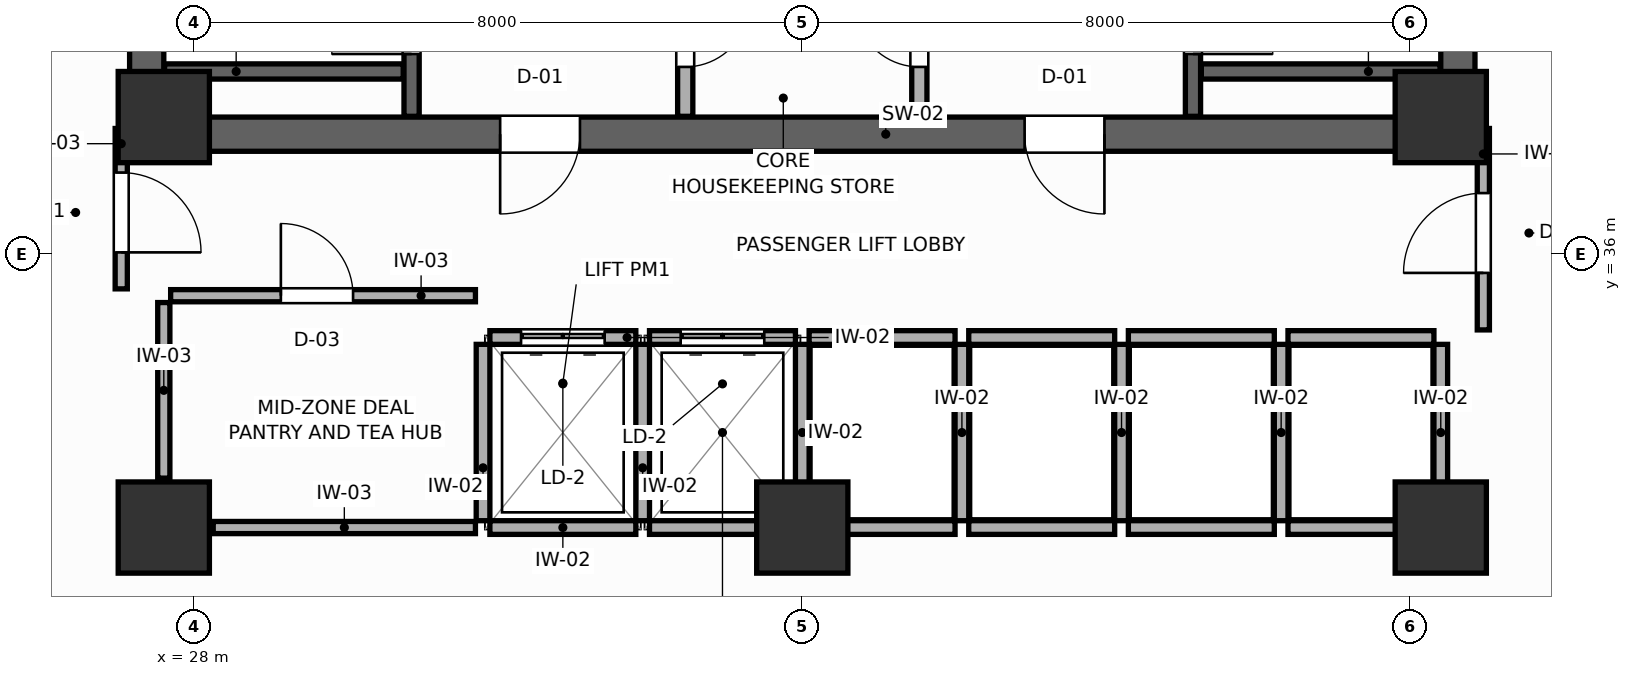
"""IFC4 building model, lengths in metres.
Left out: names, types, materials, properties, quantities, classifications, styles, units other than length and angle.
Written with IfcOpenShell. Run it as: python <this file> out.ifc"""

import sys

from ifc_helpers import new_model, si_unit, direction, frame, frame_2d, origin, origin_2d, place, context, subcontext, project, spatial, rectangle, extrude, source, transform, mapped, element, fill, save


model = new_model("IFC4")
c1 = context("Model", 3, precision=1e-05, world=origin(), true_north=direction((0.0, 1.0)))
c2 = subcontext(c1, "Body", "Model", "MODEL_VIEW")
j1 = project(units=[si_unit("LENGTHUNIT", "METRE"), si_unit("PLANEANGLEUNIT", "RADIAN")], contexts=[c1])
p1 = place(None, origin())
s1 = spatial("IfcSite", under=j1, at=p1, CompositionType="ELEMENT")
p2 = place(p1, origin())
s2 = spatial("IfcBuilding", under=s1, at=p2, CompositionType="ELEMENT")
p3 = place(p2, frame((0.0, 0.0, 117.0)))
s3 = spatial("IfcBuildingStorey", under=s2, at=p3, CompositionType="ELEMENT", Elevation=117.0)
p4 = place(p3, frame((27.15, 37.575, 0.0), z_axis=(0.0, 0.0, 1.0), x_axis=(1.0, 0.0, 0.0)))
e1 = element("IfcWall", 1, at=p4, inside=s3, PredefinedType="SHEAR", context=c2, shape_type="SweptSolid", body=[
    extrude(rectangle(XDim=17.7, YDim=0.45, at=frame_2d((8.85, 0.0))), origin(), (0.0, 0.0, 1.0), 3.6),
])
p5 = place(p4, frame((4.875, 0.0, 0.0)))
e2 = element("IfcOpeningElement", 2, at=p5, cuts=e1, PredefinedType="OPENING", context=c2, shape_type="SweptSolid", body=[
    extrude(rectangle(XDim=1.05, YDim=2.1, at=frame_2d((0.525, 1.05))), frame((0.0, 0.235, 0.0), z_axis=(0.0, -1.0, 0.0), x_axis=(1.0, 0.0, 0.0)), (0.0, 0.0, 1.0), 0.47),
])
p6 = place(p4, frame((11.775, 0.0, 0.0)))
e3 = element("IfcOpeningElement", 3, at=p6, cuts=e1, PredefinedType="OPENING", context=c2, shape_type="SweptSolid", body=[
    extrude(rectangle(XDim=1.05, YDim=2.1, at=frame_2d((0.525, 1.05))), frame((0.0, 0.235, 0.0), z_axis=(0.0, -1.0, 0.0), x_axis=(1.0, 0.0, 0.0)), (0.0, 0.0, 1.0), 0.47),
])
for number, where, z_axis, x_axis in (
    (4, (27.375, 37.8, 0.0), (0.0, 0.0, 1.0), (0.0, 1.0, 0.0)),
    (5, (44.625, 37.8, 0.0), (0.0, 0.0, 1.0), (0.0, 1.0, 0.0)),
):
    element("IfcWall", number, at=place(p3, frame(where, z_axis=z_axis, x_axis=x_axis)), inside=s3, PredefinedType="SHEAR", context=c2, shape_type="SweptSolid", body=[
        extrude(rectangle(XDim=9.0, YDim=0.45, at=frame_2d((4.5, 0.0))), origin(), (0.0, 0.0, 1.0), 3.6),
    ])
m1 = source(origin(), c2, "Body", "SweptSolid", [
    extrude(rectangle(XDim=1.2, YDim=1.2, at=origin_2d()), origin(), (0.0, 0.0, 1.0), 3.6),
])
for number, where, z_axis, x_axis in (
    (6, (27.6, 37.8, 0.0), (0.0, 0.0, 1.0), (1.0, 0.0, 0.0)),
    (7, (44.4, 37.8, 0.0), (0.0, 0.0, 1.0), (1.0, 0.0, 0.0)),
    (8, (27.6, 32.4, 0.0), (0.0, 0.0, 1.0), (1.0, 0.0, 0.0)),
    (9, (44.4, 32.4, 0.0), (0.0, 0.0, 1.0), (1.0, 0.0, 0.0)),
    (10, (36.0, 32.4, 0.0), (0.0, 0.0, 1.0), (1.0, 0.0, 0.0)),
):
    element("IfcColumn", number, at=place(p3, frame(where, z_axis=z_axis, x_axis=x_axis)), inside=s3, PredefinedType="COLUMN", context=c2, shape_type="MappedRepresentation", body=[
        mapped(m1, transform((0.0, 0.0, 0.0), scale=1.0)),
    ])
p7 = place(p3, frame((30.86, 37.81, 0.0), z_axis=(0.0, 0.0, 1.0), x_axis=(0.0, 1.0, 0.0)))
e11 = element("IfcWall", 11, at=p7, inside=s3, PredefinedType="SHEAR", context=c2, shape_type="SweptSolid", body=[
    extrude(rectangle(XDim=8.98, YDim=0.2, at=frame_2d((4.49, 0.0))), origin(), (0.0, 0.0, 1.0), 3.6),
])
p8 = place(p7, frame((0.82, 0.0, 0.0)))
e12 = element("IfcOpeningElement", 12, at=p8, cuts=e11, PredefinedType="OPENING", context=c2, shape_type="SweptSolid", body=[
    extrude(rectangle(XDim=1.05, YDim=2.1, at=frame_2d((0.525, 1.05))), frame((0.0, 0.11, 0.0), z_axis=(0.0, -1.0, 0.0), x_axis=(1.0, 0.0, 0.0)), (0.0, 0.0, 1.0), 0.22),
])
p9 = place(p3, frame((27.61, 38.4, 0.0), z_axis=(0.0, 0.0, 1.0), x_axis=(1.0, 0.0, 0.0)))
e13 = element("IfcWall", 13, at=p9, inside=s3, PredefinedType="SHEAR", context=c2, shape_type="SweptSolid", body=[
    extrude(rectangle(XDim=3.14, YDim=0.2, at=frame_2d((1.57, 0.0))), origin(), (0.0, 0.0, 1.0), 3.6),
])
p10 = place(p3, frame((41.14, 37.81, 0.0), z_axis=(0.0, 0.0, 1.0), x_axis=(0.0, 1.0, 0.0)))
e14 = element("IfcWall", 14, at=p10, inside=s3, PredefinedType="SHEAR", context=c2, shape_type="SweptSolid", body=[
    extrude(rectangle(XDim=8.98, YDim=0.2, at=frame_2d((4.49, 0.0))), origin(), (0.0, 0.0, 1.0), 3.6),
])
p11 = place(p10, frame((0.82, 0.0, 0.0)))
e15 = element("IfcOpeningElement", 15, at=p11, cuts=e14, PredefinedType="OPENING", context=c2, shape_type="SweptSolid", body=[
    extrude(rectangle(XDim=1.05, YDim=2.1, at=frame_2d((0.525, 1.05))), frame((0.0, 0.11, 0.0), z_axis=(0.0, -1.0, 0.0), x_axis=(1.0, 0.0, 0.0)), (0.0, 0.0, 1.0), 0.22),
])
p12 = place(p3, frame((41.25, 38.4, 0.0), z_axis=(0.0, 0.0, 1.0), x_axis=(1.0, 0.0, 0.0)))
e16 = element("IfcWall", 16, at=p12, inside=s3, PredefinedType="SHEAR", context=c2, shape_type="SweptSolid", body=[
    extrude(rectangle(XDim=3.14, YDim=0.2, at=frame_2d((1.57, 0.0))), origin(), (0.0, 0.0, 1.0), 3.6),
])
p13 = place(p3, frame((34.46, 37.81, 0.0), z_axis=(0.0, 0.0, 1.0), x_axis=(0.0, 1.0, 0.0)))
e17 = element("IfcWall", 17, at=p13, inside=s3, PredefinedType="PARTITIONING", context=c2, shape_type="SweptSolid", body=[
    extrude(rectangle(XDim=8.98, YDim=0.2, at=frame_2d((4.49, 0.0))), origin(), (0.0, 0.0, 1.0), 3.4),
])
p14 = place(p13, frame((0.65, 0.0, 0.0)))
e18 = element("IfcOpeningElement", 18, at=p14, cuts=e17, PredefinedType="OPENING", context=c2, shape_type="SweptSolid", body=[
    extrude(rectangle(XDim=0.85, YDim=2.05, at=frame_2d((0.425, 1.025))), frame((0.0, 0.11, 0.0), z_axis=(0.0, -1.0, 0.0), x_axis=(1.0, 0.0, 0.0)), (0.0, 0.0, 1.0), 0.22),
])
p15 = place(p3, frame((37.54, 37.81, 0.0), z_axis=(0.0, 0.0, 1.0), x_axis=(0.0, 1.0, 0.0)))
e19 = element("IfcWall", 19, at=p15, inside=s3, PredefinedType="PARTITIONING", context=c2, shape_type="SweptSolid", body=[
    extrude(rectangle(XDim=8.98, YDim=0.2, at=frame_2d((4.49, 0.0))), origin(), (0.0, 0.0, 1.0), 3.4),
])
p16 = place(p15, frame((0.65, 0.0, 0.0)))
e20 = element("IfcOpeningElement", 20, at=p16, cuts=e19, PredefinedType="OPENING", context=c2, shape_type="SweptSolid", body=[
    extrude(rectangle(XDim=0.85, YDim=2.05, at=frame_2d((0.425, 1.025))), frame((0.0, 0.11, 0.0), z_axis=(0.0, -1.0, 0.0), x_axis=(1.0, 0.0, 0.0)), (0.0, 0.0, 1.0), 0.22),
])
p17 = place(p3, frame((31.89, 34.9, 0.0), z_axis=(0.0, 0.0, 1.0), x_axis=(1.0, 0.0, 0.0)))
e21 = element("IfcWall", 21, at=p17, inside=s3, PredefinedType="PARTITIONING", context=c2, shape_type="SweptSolid", body=[
    extrude(rectangle(XDim=1.92, YDim=0.18, at=frame_2d((0.96, 0.0))), origin(), (0.0, 0.0, 1.0), 3.4),
])
p18 = place(p17, frame((0.41, 0.0, 0.0)))
e22 = element("IfcOpeningElement", 22, at=p18, cuts=e21, PredefinedType="OPENING", context=c2, shape_type="SweptSolid", body=[
    extrude(rectangle(XDim=1.1, YDim=2.1, at=frame_2d((0.55, 1.05))), frame((0.0, 0.1, 0.0), z_axis=(0.0, -1.0, 0.0), x_axis=(1.0, 0.0, 0.0)), (0.0, 0.0, 1.0), 0.2),
])
p19 = place(p3, frame((31.89, 32.4, 0.0), z_axis=(0.0, 0.0, 1.0), x_axis=(1.0, 0.0, 0.0)))
e23 = element("IfcWall", 23, at=p19, inside=s3, PredefinedType="PARTITIONING", context=c2, shape_type="SweptSolid", body=[
    extrude(rectangle(XDim=1.92, YDim=0.18, at=frame_2d((0.96, 0.0))), origin(), (0.0, 0.0, 1.0), 2.16),
])
p20 = place(p3, frame((31.8, 32.49, 0.0), z_axis=(0.0, 0.0, 1.0), x_axis=(0.0, 1.0, 0.0)))
e24 = element("IfcWall", 24, at=p20, inside=s3, PredefinedType="PARTITIONING", context=c2, shape_type="SweptSolid", body=[
    extrude(rectangle(XDim=2.32, YDim=0.18, at=frame_2d((1.16, 0.0))), origin(), (0.0, 0.0, 1.0), 3.4),
])
p21 = place(p3, frame((33.99, 34.9, 0.0), z_axis=(0.0, 0.0, 1.0), x_axis=(1.0, 0.0, 0.0)))
e25 = element("IfcWall", 25, at=p21, inside=s3, PredefinedType="PARTITIONING", context=c2, shape_type="SweptSolid", body=[
    extrude(rectangle(XDim=1.92, YDim=0.18, at=frame_2d((0.96, 0.0))), origin(), (0.0, 0.0, 1.0), 3.4),
])
p22 = place(p21, frame((0.41, 0.0, 0.0)))
e26 = element("IfcOpeningElement", 26, at=p22, cuts=e25, PredefinedType="OPENING", context=c2, shape_type="SweptSolid", body=[
    extrude(rectangle(XDim=1.1, YDim=2.1, at=frame_2d((0.55, 1.05))), frame((0.0, 0.1, 0.0), z_axis=(0.0, -1.0, 0.0), x_axis=(1.0, 0.0, 0.0)), (0.0, 0.0, 1.0), 0.2),
])
p23 = place(p3, frame((33.99, 32.4, 0.0), z_axis=(0.0, 0.0, 1.0), x_axis=(1.0, 0.0, 0.0)))
e27 = element("IfcWall", 27, at=p23, inside=s3, PredefinedType="PARTITIONING", context=c2, shape_type="SweptSolid", body=[
    extrude(rectangle(XDim=1.92, YDim=0.18, at=frame_2d((0.96, 0.0))), origin(), (0.0, 0.0, 1.0), 2.16),
])
p24 = place(p3, frame((33.9, 32.49, 0.0), z_axis=(0.0, 0.0, 1.0), x_axis=(0.0, 1.0, 0.0)))
e28 = element("IfcWall", 28, at=p24, inside=s3, PredefinedType="PARTITIONING", context=c2, shape_type="SweptSolid", body=[
    extrude(rectangle(XDim=2.32, YDim=0.18, at=frame_2d((1.16, 0.0))), origin(), (0.0, 0.0, 1.0), 3.4),
])
p25 = place(p3, frame((36.09, 34.9, 0.0), z_axis=(0.0, 0.0, 1.0), x_axis=(1.0, 0.0, 0.0)))
e29 = element("IfcWall", 29, at=p25, inside=s3, PredefinedType="PARTITIONING", context=c2, shape_type="SweptSolid", body=[
    extrude(rectangle(XDim=1.92, YDim=0.18, at=frame_2d((0.96, 0.0))), origin(), (0.0, 0.0, 1.0), 3.4),
])
p26 = place(p3, frame((36.09, 32.4, 0.0), z_axis=(0.0, 0.0, 1.0), x_axis=(1.0, 0.0, 0.0)))
e30 = element("IfcWall", 30, at=p26, inside=s3, PredefinedType="PARTITIONING", context=c2, shape_type="SweptSolid", body=[
    extrude(rectangle(XDim=1.92, YDim=0.18, at=frame_2d((0.96, 0.0))), origin(), (0.0, 0.0, 1.0), 2.16),
])
p27 = place(p3, frame((36.0, 32.49, 0.0), z_axis=(0.0, 0.0, 1.0), x_axis=(0.0, 1.0, 0.0)))
e31 = element("IfcWall", 31, at=p27, inside=s3, PredefinedType="PARTITIONING", context=c2, shape_type="SweptSolid", body=[
    extrude(rectangle(XDim=2.32, YDim=0.18, at=frame_2d((1.16, 0.0))), origin(), (0.0, 0.0, 1.0), 3.4),
])
p28 = place(p3, frame((38.19, 34.9, 0.0), z_axis=(0.0, 0.0, 1.0), x_axis=(1.0, 0.0, 0.0)))
e32 = element("IfcWall", 32, at=p28, inside=s3, PredefinedType="PARTITIONING", context=c2, shape_type="SweptSolid", body=[
    extrude(rectangle(XDim=1.92, YDim=0.18, at=frame_2d((0.96, 0.0))), origin(), (0.0, 0.0, 1.0), 3.4),
])
p29 = place(p3, frame((38.19, 32.4, 0.0), z_axis=(0.0, 0.0, 1.0), x_axis=(1.0, 0.0, 0.0)))
e33 = element("IfcWall", 33, at=p29, inside=s3, PredefinedType="PARTITIONING", context=c2, shape_type="SweptSolid", body=[
    extrude(rectangle(XDim=1.92, YDim=0.18, at=frame_2d((0.96, 0.0))), origin(), (0.0, 0.0, 1.0), 2.16),
])
p30 = place(p3, frame((38.1, 32.49, 0.0), z_axis=(0.0, 0.0, 1.0), x_axis=(0.0, 1.0, 0.0)))
e34 = element("IfcWall", 34, at=p30, inside=s3, PredefinedType="PARTITIONING", context=c2, shape_type="SweptSolid", body=[
    extrude(rectangle(XDim=2.32, YDim=0.18, at=frame_2d((1.16, 0.0))), origin(), (0.0, 0.0, 1.0), 3.4),
])
p31 = place(p3, frame((40.29, 34.9, 0.0), z_axis=(0.0, 0.0, 1.0), x_axis=(1.0, 0.0, 0.0)))
e35 = element("IfcWall", 35, at=p31, inside=s3, PredefinedType="PARTITIONING", context=c2, shape_type="SweptSolid", body=[
    extrude(rectangle(XDim=1.92, YDim=0.18, at=frame_2d((0.96, 0.0))), origin(), (0.0, 0.0, 1.0), 3.4),
])
p32 = place(p3, frame((40.29, 32.4, 0.0), z_axis=(0.0, 0.0, 1.0), x_axis=(1.0, 0.0, 0.0)))
e36 = element("IfcWall", 36, at=p32, inside=s3, PredefinedType="PARTITIONING", context=c2, shape_type="SweptSolid", body=[
    extrude(rectangle(XDim=1.92, YDim=0.18, at=frame_2d((0.96, 0.0))), origin(), (0.0, 0.0, 1.0), 2.16),
])
p33 = place(p3, frame((40.2, 32.49, 0.0), z_axis=(0.0, 0.0, 1.0), x_axis=(0.0, 1.0, 0.0)))
e37 = element("IfcWall", 37, at=p33, inside=s3, PredefinedType="PARTITIONING", context=c2, shape_type="SweptSolid", body=[
    extrude(rectangle(XDim=2.32, YDim=0.18, at=frame_2d((1.16, 0.0))), origin(), (0.0, 0.0, 1.0), 3.4),
])
p34 = place(p3, frame((42.39, 34.9, 0.0), z_axis=(0.0, 0.0, 1.0), x_axis=(1.0, 0.0, 0.0)))
e38 = element("IfcWall", 38, at=p34, inside=s3, PredefinedType="PARTITIONING", context=c2, shape_type="SweptSolid", body=[
    extrude(rectangle(XDim=1.92, YDim=0.18, at=frame_2d((0.96, 0.0))), origin(), (0.0, 0.0, 1.0), 3.4),
])
p35 = place(p3, frame((42.39, 32.4, 0.0), z_axis=(0.0, 0.0, 1.0), x_axis=(1.0, 0.0, 0.0)))
e39 = element("IfcWall", 39, at=p35, inside=s3, PredefinedType="PARTITIONING", context=c2, shape_type="SweptSolid", body=[
    extrude(rectangle(XDim=1.92, YDim=0.18, at=frame_2d((0.96, 0.0))), origin(), (0.0, 0.0, 1.0), 2.16),
])
for number, where, z_axis, x_axis in (
    (40, (42.3, 32.49, 0.0), (0.0, 0.0, 1.0), (0.0, 1.0, 0.0)),
    (41, (44.4, 32.49, 0.0), (0.0, 0.0, 1.0), (0.0, 1.0, 0.0)),
):
    element("IfcWall", number, at=place(p3, frame(where, z_axis=z_axis, x_axis=x_axis)), inside=s3, PredefinedType="PARTITIONING", context=c2, shape_type="SweptSolid", body=[
        extrude(rectangle(XDim=2.32, YDim=0.18, at=frame_2d((1.16, 0.0))), origin(), (0.0, 0.0, 1.0), 3.4),
    ])
p36 = place(p3, frame((28.25, 32.4, 0.0), z_axis=(0.0, 0.0, 1.0), x_axis=(1.0, 0.0, 0.0)))
e42 = element("IfcWall", 42, at=p36, inside=s3, PredefinedType="PARTITIONING", context=c2, shape_type="SweptSolid", body=[
    extrude(rectangle(XDim=3.45, YDim=0.16, at=frame_2d((1.725, 0.0))), origin(), (0.0, 0.0, 1.0), 2.16),
])
p37 = place(p3, frame((27.6, 33.05, 0.0), z_axis=(0.0, 0.0, 1.0), x_axis=(0.0, 1.0, 0.0)))
e43 = element("IfcWall", 43, at=p37, inside=s3, PredefinedType="PARTITIONING", context=c2, shape_type="SweptSolid", body=[
    extrude(rectangle(XDim=2.31, YDim=0.16, at=frame_2d((1.155, 0.0))), origin(), (0.0, 0.0, 1.0), 3.4),
])
p38 = place(p3, frame((27.69, 35.45, 0.0), z_axis=(0.0, 0.0, 1.0), x_axis=(1.0, 0.0, 0.0)))
e44 = element("IfcWall", 44, at=p38, inside=s3, PredefinedType="PARTITIONING", context=c2, shape_type="SweptSolid", body=[
    extrude(rectangle(XDim=4.01, YDim=0.16, at=frame_2d((2.005, 0.0))), origin(), (0.0, 0.0, 1.0), 3.4),
])
p39 = place(p38, frame((1.45, 0.0, 0.0)))
e45 = element("IfcOpeningElement", 45, at=p39, cuts=e44, PredefinedType="OPENING", context=c2, shape_type="SweptSolid", body=[
    extrude(rectangle(XDim=0.95, YDim=2.05, at=frame_2d((0.475, 1.025))), frame((0.0, 0.09, 0.0), z_axis=(0.0, -1.0, 0.0), x_axis=(1.0, 0.0, 0.0)), (0.0, 0.0, 1.0), 0.18),
])
p40 = place(p3, frame((27.04, 35.54, 0.0), z_axis=(0.0, 0.0, 1.0), x_axis=(0.0, 1.0, 0.0)))
e46 = element("IfcWall", 46, at=p40, inside=s3, PredefinedType="PARTITIONING", context=c2, shape_type="SweptSolid", body=[
    extrude(rectangle(XDim=2.11, YDim=0.16, at=frame_2d((1.055, 0.0))), origin(), (0.0, 0.0, 1.0), 3.4),
])
p41 = place(p40, frame((0.48, 0.0, 0.0)))
e47 = element("IfcOpeningElement", 47, at=p41, cuts=e46, PredefinedType="OPENING", context=c2, shape_type="SweptSolid", body=[
    extrude(rectangle(XDim=1.05, YDim=2.1, at=frame_2d((0.525, 1.05))), frame((0.0, 0.09, 0.0), z_axis=(0.0, -1.0, 0.0), x_axis=(1.0, 0.0, 0.0)), (0.0, 0.0, 1.0), 0.18),
])
p42 = place(p3, frame((44.96, 35.0, 0.0), z_axis=(0.0, 0.0, 1.0), x_axis=(0.0, 1.0, 0.0)))
e48 = element("IfcWall", 48, at=p42, inside=s3, PredefinedType="PARTITIONING", context=c2, shape_type="SweptSolid", body=[
    extrude(rectangle(XDim=2.65, YDim=0.16, at=frame_2d((1.325, 0.0))), origin(), (0.0, 0.0, 1.0), 3.4),
])
p43 = place(p42, frame((0.75, 0.0, 0.0)))
e49 = element("IfcOpeningElement", 49, at=p43, cuts=e48, PredefinedType="OPENING", context=c2, shape_type="SweptSolid", body=[
    extrude(rectangle(XDim=1.05, YDim=2.1, at=frame_2d((0.525, 1.05))), frame((0.0, 0.09, 0.0), z_axis=(0.0, -1.0, 0.0), x_axis=(1.0, 0.0, 0.0)), (0.0, 0.0, 1.0), 0.18),
])
p44 = place(p8, origin())
e50 = element("IfcDoor", 50, at=p44, inside=s3, OperationType="SINGLE_SWING_LEFT", PredefinedType="DOOR", context=c2, shape_type="SweptSolid", body=[
    extrude(rectangle(XDim=1.05, YDim=2.1, at=frame_2d((0.525, 1.05))), frame((0.0, 0.025, 0.0), z_axis=(0.0, -1.0, 0.0), x_axis=(1.0, 0.0, 0.0)), (0.0, 0.0, 1.0), 0.05),
])
fill(e12, e50)
p45 = place(p11, frame((1.05, 0.0, 0.0), z_axis=(0.0, 0.0, 1.0), x_axis=(-1.0, 0.0, 0.0)))
e51 = element("IfcDoor", 51, at=p45, inside=s3, OperationType="SINGLE_SWING_RIGHT", PredefinedType="DOOR", context=c2, shape_type="SweptSolid", body=[
    extrude(rectangle(XDim=1.05, YDim=2.1, at=frame_2d((0.525, 1.05))), frame((0.0, 0.025, 0.0), z_axis=(0.0, -1.0, 0.0), x_axis=(1.0, 0.0, 0.0)), (0.0, 0.0, 1.0), 0.05),
])
fill(e15, e51)
p46 = place(p14, frame((0.85, 0.0, 0.0), z_axis=(0.0, 0.0, 1.0), x_axis=(-1.0, 0.0, 0.0)))
e52 = element("IfcDoor", 52, at=p46, inside=s3, OperationType="SINGLE_SWING_LEFT", PredefinedType="DOOR", context=c2, shape_type="SweptSolid", body=[
    extrude(rectangle(XDim=0.85, YDim=2.05, at=frame_2d((0.425, 1.025))), frame((0.0, 0.025, 0.0), z_axis=(0.0, -1.0, 0.0), x_axis=(1.0, 0.0, 0.0)), (0.0, 0.0, 1.0), 0.05),
])
fill(e18, e52)
p47 = place(p16, origin())
e53 = element("IfcDoor", 53, at=p47, inside=s3, OperationType="SINGLE_SWING_RIGHT", PredefinedType="DOOR", context=c2, shape_type="SweptSolid", body=[
    extrude(rectangle(XDim=0.85, YDim=2.05, at=frame_2d((0.425, 1.025))), frame((0.0, 0.025, 0.0), z_axis=(0.0, -1.0, 0.0), x_axis=(1.0, 0.0, 0.0)), (0.0, 0.0, 1.0), 0.05),
])
fill(e20, e53)
p48 = place(p18, origin())
e54 = element("IfcDoor", 54, at=p48, inside=s3, OperationType="DOUBLE_DOOR_SLIDING", PredefinedType="DOOR", context=c2, shape_type="SweptSolid", body=[
    extrude(rectangle(XDim=1.1, YDim=2.1, at=frame_2d((0.55, 1.05))), frame((0.0, 0.025, 0.0), z_axis=(0.0, -1.0, 0.0), x_axis=(1.0, 0.0, 0.0)), (0.0, 0.0, 1.0), 0.05),
])
fill(e22, e54)
p49 = place(p22, origin())
e55 = element("IfcDoor", 55, at=p49, inside=s3, OperationType="DOUBLE_DOOR_SLIDING", PredefinedType="DOOR", context=c2, shape_type="SweptSolid", body=[
    extrude(rectangle(XDim=1.1, YDim=2.1, at=frame_2d((0.55, 1.05))), frame((0.0, 0.025, 0.0), z_axis=(0.0, -1.0, 0.0), x_axis=(1.0, 0.0, 0.0)), (0.0, 0.0, 1.0), 0.05),
])
fill(e26, e55)
p50 = place(p39, origin())
e56 = element("IfcDoor", 56, at=p50, inside=s3, OperationType="SINGLE_SWING_LEFT", PredefinedType="DOOR", context=c2, shape_type="SweptSolid", body=[
    extrude(rectangle(XDim=0.95, YDim=2.05, at=frame_2d((0.475, 1.025))), frame((0.0, 0.025, 0.0), z_axis=(0.0, -1.0, 0.0), x_axis=(1.0, 0.0, 0.0)), (0.0, 0.0, 1.0), 0.05),
])
fill(e45, e56)
p51 = place(p41, frame((1.05, 0.0, 0.0), z_axis=(0.0, 0.0, 1.0), x_axis=(-1.0, 0.0, 0.0)))
e57 = element("IfcDoor", 57, at=p51, inside=s3, OperationType="SINGLE_SWING_RIGHT", PredefinedType="DOOR", context=c2, shape_type="SweptSolid", body=[
    extrude(rectangle(XDim=1.05, YDim=2.1, at=frame_2d((0.525, 1.05))), frame((0.0, 0.025, 0.0), z_axis=(0.0, -1.0, 0.0), x_axis=(1.0, 0.0, 0.0)), (0.0, 0.0, 1.0), 0.05),
])
fill(e47, e57)
p52 = place(p43, origin())
e58 = element("IfcDoor", 58, at=p52, inside=s3, OperationType="SINGLE_SWING_LEFT", PredefinedType="DOOR", context=c2, shape_type="SweptSolid", body=[
    extrude(rectangle(XDim=1.05, YDim=2.1, at=frame_2d((0.525, 1.05))), frame((0.0, 0.025, 0.0), z_axis=(0.0, -1.0, 0.0), x_axis=(1.0, 0.0, 0.0)), (0.0, 0.0, 1.0), 0.05),
])
fill(e49, e58)
p53 = place(p5, frame((1.05, 0.0, 0.0), z_axis=(0.0, 0.0, 1.0), x_axis=(-1.0, 0.0, 0.0)))
e59 = element("IfcDoor", 59, at=p53, inside=s3, OperationType="SINGLE_SWING_RIGHT", PredefinedType="DOOR", context=c2, shape_type="SweptSolid", body=[
    extrude(rectangle(XDim=1.05, YDim=2.1, at=frame_2d((0.525, 1.05))), frame((0.0, 0.025, 0.0), z_axis=(0.0, -1.0, 0.0), x_axis=(1.0, 0.0, 0.0)), (0.0, 0.0, 1.0), 0.05),
])
fill(e2, e59)
p54 = place(p6, frame((1.05, 0.0, 0.0), z_axis=(0.0, 0.0, 1.0), x_axis=(-1.0, 0.0, 0.0)))
e60 = element("IfcDoor", 60, at=p54, inside=s3, OperationType="SINGLE_SWING_LEFT", PredefinedType="DOOR", context=c2, shape_type="SweptSolid", body=[
    extrude(rectangle(XDim=1.05, YDim=2.1, at=frame_2d((0.525, 1.05))), frame((0.0, 0.025, 0.0), z_axis=(0.0, -1.0, 0.0), x_axis=(1.0, 0.0, 0.0)), (0.0, 0.0, 1.0), 0.05),
])
fill(e3, e60)
save(model, sys.argv[1])
